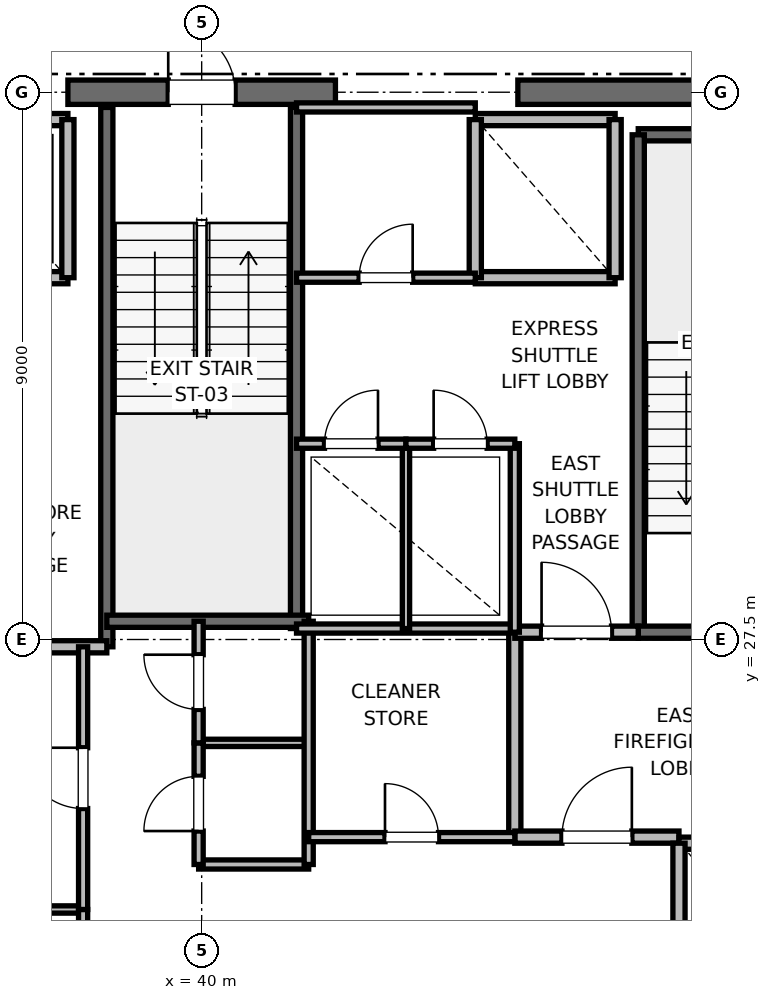
"""IFC4 building model, lengths in metres.
Left out: names, types, materials, properties, quantities, classifications, styles, units other than length and angle.
Written with IfcOpenShell. Run it as: python <this file> out.ifc"""

import sys

from ifc_helpers import new_model, si_unit, direction, frame, frame_2d, origin, place, context, subcontext, project, spatial, rectangle, extrude, element, fill, save


model = new_model("IFC4")
c1 = context("Model", 3, precision=1e-05, world=origin(), true_north=direction((0.0, 1.0)))
c2 = subcontext(c1, "Body", "Model", "MODEL_VIEW")
j1 = project(units=[si_unit("LENGTHUNIT", "METRE"), si_unit("PLANEANGLEUNIT", "RADIAN")], contexts=[c1])
p1 = place(None, origin())
s1 = spatial("IfcSite", under=j1, at=p1, CompositionType="ELEMENT")
p2 = place(p1, origin())
s2 = spatial("IfcBuilding", under=s1, at=p2, CompositionType="ELEMENT")
p3 = place(p2, frame((0.0, 0.0, 326.8)))
s3 = spatial("IfcBuildingStorey", under=s2, at=p3, CompositionType="ELEMENT", Elevation=326.8)
p4 = place(p3, frame((37.8, 36.5, 0.0), z_axis=(0.0, 0.0, 1.0), x_axis=(1.0, 0.0, 0.0)))
e1 = element("IfcWall", 1, at=p4, inside=s3, PredefinedType="SHEAR", context=c2, shape_type="SweptSolid", body=[
    extrude(rectangle(XDim=4.4, YDim=0.4, at=frame_2d((2.2, 0.0))), origin(), (0.0, 0.0, 1.0), 3.785),
])
p5 = place(p4, frame((1.65, 0.0, 0.0)))
e2 = element("IfcOpeningElement", 2, at=p5, cuts=e1, PredefinedType="OPENING", context=c2, shape_type="SweptSolid", body=[
    extrude(rectangle(XDim=1.1, YDim=2.15, at=frame_2d((0.55, 1.075))), frame((0.0, 0.2, 0.0), z_axis=(0.0, -1.0, 0.0), x_axis=(1.0, 0.0, 0.0)), (0.0, 0.0, 1.0), 0.4),
])
p6 = place(p3, frame((45.2, 36.5, 0.0), z_axis=(0.0, 0.0, 1.0), x_axis=(1.0, 0.0, 0.0)))
e3 = element("IfcWall", 3, at=p6, inside=s3, PredefinedType="SHEAR", context=c2, shape_type="SweptSolid", body=[
    extrude(rectangle(XDim=5.8, YDim=0.4, at=frame_2d((2.9, 0.0))), origin(), (0.0, 0.0, 1.0), 3.785),
])
p7 = place(p3, frame((47.18, 35.8, 0.0), z_axis=(0.0, 0.0, 1.0), x_axis=(1.0, 0.0, 0.0)))
e4 = element("IfcWall", 4, at=p7, inside=s3, PredefinedType="SOLIDWALL", context=c2, shape_type="SweptSolid", body=[
    extrude(rectangle(XDim=3.12, YDim=0.2, at=frame_2d((1.56, 0.0))), origin(), (0.0, 0.0, 1.0), 3.785),
])
p8 = place(p3, frame((47.18, 27.62, 0.0), z_axis=(0.0, 0.0, 1.0), x_axis=(0.0, 1.0, 0.0)))
e5 = element("IfcWall", 5, at=p8, inside=s3, PredefinedType="SOLIDWALL", context=c2, shape_type="SweptSolid", body=[
    extrude(rectangle(XDim=8.18, YDim=0.2, at=frame_2d((4.09, 0.0))), origin(), (0.0, 0.0, 1.0), 3.785),
])
p9 = place(p3, frame((47.18, 27.62, 0.0), z_axis=(0.0, 0.0, 1.0), x_axis=(1.0, 0.0, 0.0)))
e6 = element("IfcWall", 6, at=p9, inside=s3, PredefinedType="SOLIDWALL", context=c2, shape_type="SweptSolid", body=[
    extrude(rectangle(XDim=3.12, YDim=0.2, at=frame_2d((1.56, 0.0))), origin(), (0.0, 0.0, 1.0), 3.785),
])
p10 = place(p9, frame((1.01, 0.0, 0.0)))
e7 = element("IfcOpeningElement", 7, at=p10, cuts=e6, PredefinedType="OPENING", context=c2, shape_type="SweptSolid", body=[
    extrude(rectangle(XDim=1.1, YDim=2.15, at=frame_2d((0.55, 1.075))), frame((0.0, 0.1, 0.0), z_axis=(0.0, -1.0, 0.0), x_axis=(1.0, 0.0, 0.0)), (0.0, 0.0, 1.0), 0.2),
])
p11 = place(p3, frame((38.44, 27.38, 0.0), z_axis=(0.0, 0.0, 1.0), x_axis=(0.0, 1.0, 0.0)))
e8 = element("IfcWall", 8, at=p11, inside=s3, PredefinedType="SOLIDWALL", context=c2, shape_type="SweptSolid", body=[
    extrude(rectangle(XDim=8.87, YDim=0.2, at=frame_2d((4.435, 0.0))), origin(), (0.0, 0.0, 1.0), 3.785),
])
p12 = place(p3, frame((41.56, 27.68, 0.0), z_axis=(0.0, 0.0, 1.0), x_axis=(0.0, 1.0, 0.0)))
e9 = element("IfcWall", 9, at=p12, inside=s3, PredefinedType="SOLIDWALL", context=c2, shape_type="SweptSolid", body=[
    extrude(rectangle(XDim=8.57, YDim=0.2, at=frame_2d((4.285, 0.0))), origin(), (0.0, 0.0, 1.0), 3.785),
])
p13 = place(p3, frame((38.44, 27.8, 0.0), z_axis=(0.0, 0.0, 1.0), x_axis=(1.0, 0.0, 0.0)))
e10 = element("IfcWall", 10, at=p13, inside=s3, PredefinedType="SOLIDWALL", context=c2, shape_type="SweptSolid", body=[
    extrude(rectangle(XDim=3.32, YDim=0.2, at=frame_2d((1.66, 0.0))), origin(), (0.0, 0.0, 1.0), 3.785),
])
p14 = place(p3, frame((32.82, 27.38, 0.0), z_axis=(0.0, 0.0, 1.0), x_axis=(1.0, 0.0, 0.0)))
e11 = element("IfcWall", 11, at=p14, inside=s3, PredefinedType="PARTITIONING", context=c2, shape_type="SweptSolid", body=[
    extrude(rectangle(XDim=5.62, YDim=0.2, at=frame_2d((2.81, 0.0))), origin(), (0.0, 0.0, 1.0), 3.785),
])
p15 = place(p3, frame((45.15, 24.25, 0.0), z_axis=(0.0, 0.0, 1.0), x_axis=(0.0, 1.0, 0.0)))
e12 = element("IfcWall", 12, at=p15, inside=s3, PredefinedType="PARTITIONING", context=c2, shape_type="SweptSolid", body=[
    extrude(rectangle(XDim=3.37, YDim=0.2, at=frame_2d((1.685, 0.0))), origin(), (0.0, 0.0, 1.0), 3.785),
])
p16 = place(p3, frame((45.15, 24.25, 0.0), z_axis=(0.0, 0.0, 1.0), x_axis=(1.0, 0.0, 0.0)))
e13 = element("IfcWall", 13, at=p16, inside=s3, PredefinedType="PARTITIONING", context=c2, shape_type="SweptSolid", body=[
    extrude(rectangle(XDim=2.7, YDim=0.2, at=frame_2d((1.35, 0.0))), origin(), (0.0, 0.0, 1.0), 3.785),
])
p17 = place(p16, frame((0.775, 0.0, 0.0)))
e14 = element("IfcOpeningElement", 14, at=p17, cuts=e13, PredefinedType="OPENING", context=c2, shape_type="SweptSolid", body=[
    extrude(rectangle(XDim=1.15, YDim=2.2, at=frame_2d((0.575, 1.1))), frame((0.0, 0.1, 0.0), z_axis=(0.0, -1.0, 0.0), x_axis=(1.0, 0.0, 0.0)), (0.0, 0.0, 1.0), 0.2),
])
p18 = place(p3, frame((45.15, 27.62, 0.0), z_axis=(0.0, 0.0, 1.0), x_axis=(1.0, 0.0, 0.0)))
e15 = element("IfcWall", 15, at=p18, inside=s3, PredefinedType="PARTITIONING", context=c2, shape_type="SweptSolid", body=[
    extrude(rectangle(XDim=2.03, YDim=0.2, at=frame_2d((1.015, 0.0))), origin(), (0.0, 0.0, 1.0), 3.785),
])
p19 = place(p18, frame((0.44, 0.0, 0.0)))
e16 = element("IfcOpeningElement", 16, at=p19, cuts=e15, PredefinedType="OPENING", context=c2, shape_type="SweptSolid", body=[
    extrude(rectangle(XDim=1.15, YDim=2.2, at=frame_2d((0.575, 1.1))), frame((0.0, 0.1, 0.0), z_axis=(0.0, -1.0, 0.0), x_axis=(1.0, 0.0, 0.0)), (0.0, 0.0, 1.0), 0.2),
])
p20 = place(p3, frame((50.45, 24.15, 0.0), z_axis=(0.0, 0.0, 1.0), x_axis=(-1.0, 0.0, 0.0)))
e17 = element("IfcWall", 17, at=p20, inside=s3, PredefinedType="SOLIDWALL", context=c2, shape_type="SweptSolid", body=[
    extrude(rectangle(XDim=2.6, YDim=0.2, at=frame_2d((1.3, 0.0))), origin(), (0.0, 0.0, 1.0), 2.865),
])
p21 = place(p20, frame((0.75, 0.0, 0.0)))
e18 = element("IfcOpeningElement", 18, at=p21, cuts=e17, PredefinedType="OPENING", context=c2, shape_type="SweptSolid", body=[
    extrude(rectangle(XDim=1.1, YDim=2.2, at=frame_2d((0.55, 1.1))), frame((0.0, 0.1, 0.0), z_axis=(0.0, -1.0, 0.0), x_axis=(1.0, 0.0, 0.0)), (0.0, 0.0, 1.0), 0.2),
])
p22 = place(p3, frame((47.85, 24.15, 0.0), z_axis=(0.0, 0.0, 1.0), x_axis=(0.0, -1.0, 0.0)))
e19 = element("IfcWall", 19, at=p22, inside=s3, PredefinedType="SOLIDWALL", context=c2, shape_type="SweptSolid", body=[
    extrude(rectangle(XDim=3.0, YDim=0.2, at=frame_2d((1.5, 0.0))), origin(), (0.0, 0.0, 1.0), 3.785),
])
p23 = place(p3, frame((35.5, 33.45, 0.0), z_axis=(0.0, 0.0, 1.0), x_axis=(1.0, 0.0, 0.0)))
e20 = element("IfcWall", 20, at=p23, inside=s3, PredefinedType="SOLIDWALL", context=c2, shape_type="SweptSolid", body=[
    extrude(rectangle(XDim=2.3, YDim=0.2, at=frame_2d((1.15, 0.0))), origin(), (0.0, 0.0, 1.0), 3.785),
])
p24 = place(p23, frame((0.6, 0.0, 0.0)))
e21 = element("IfcOpeningElement", 21, at=p24, cuts=e20, PredefinedType="OPENING", context=c2, shape_type="SweptSolid", body=[
    extrude(rectangle(XDim=1.1, YDim=2.2, at=frame_2d((0.55, 1.1))), frame((0.0, 0.1, 0.0), z_axis=(0.0, -1.0, 0.0), x_axis=(1.0, 0.0, 0.0)), (0.0, 0.0, 1.0), 0.2),
])
p25 = place(p3, frame((37.8, 36.05, 0.0), z_axis=(0.0, 0.0, 1.0), x_axis=(-1.0, 0.0, 0.0)))
e22 = element("IfcWall", 22, at=p25, inside=s3, PredefinedType="SOLIDWALL", context=c2, shape_type="SweptSolid", body=[
    extrude(rectangle(XDim=2.3, YDim=0.2, at=frame_2d((1.15, 0.0))), origin(), (0.0, 0.0, 1.0), 2.865),
])
p26 = place(p3, frame((37.8, 33.45, 0.0), z_axis=(0.0, 0.0, 1.0), x_axis=(0.0, 1.0, 0.0)))
e23 = element("IfcWall", 23, at=p26, inside=s3, PredefinedType="SOLIDWALL", context=c2, shape_type="SweptSolid", body=[
    extrude(rectangle(XDim=2.6, YDim=0.2, at=frame_2d((1.3, 0.0))), origin(), (0.0, 0.0, 1.0), 2.865),
])
p27 = place(p3, frame((44.5, 33.45, 0.0), z_axis=(0.0, 0.0, 1.0), x_axis=(1.0, 0.0, 0.0)))
e24 = element("IfcWall", 24, at=p27, inside=s3, PredefinedType="SOLIDWALL", context=c2, shape_type="SweptSolid", body=[
    extrude(rectangle(XDim=2.3, YDim=0.2, at=frame_2d((1.15, 0.0))), origin(), (0.0, 0.0, 1.0), 3.785),
])
p28 = place(p3, frame((46.8, 36.05, 0.0), z_axis=(0.0, 0.0, 1.0), x_axis=(-1.0, 0.0, 0.0)))
e25 = element("IfcWall", 25, at=p28, inside=s3, PredefinedType="SOLIDWALL", context=c2, shape_type="SweptSolid", body=[
    extrude(rectangle(XDim=2.3, YDim=0.2, at=frame_2d((1.15, 0.0))), origin(), (0.0, 0.0, 1.0), 2.865),
])
p29 = place(p3, frame((44.5, 36.05, 0.0), z_axis=(0.0, 0.0, 1.0), x_axis=(0.0, -1.0, 0.0)))
e26 = element("IfcWall", 26, at=p29, inside=s3, PredefinedType="SOLIDWALL", context=c2, shape_type="SweptSolid", body=[
    extrude(rectangle(XDim=2.6, YDim=0.2, at=frame_2d((1.3, 0.0))), origin(), (0.0, 0.0, 1.0), 2.865),
])
p30 = place(p3, frame((46.8, 33.45, 0.0), z_axis=(0.0, 0.0, 1.0), x_axis=(0.0, 1.0, 0.0)))
e27 = element("IfcWall", 27, at=p30, inside=s3, PredefinedType="SOLIDWALL", context=c2, shape_type="SweptSolid", body=[
    extrude(rectangle(XDim=2.6, YDim=0.2, at=frame_2d((1.3, 0.0))), origin(), (0.0, 0.0, 1.0), 3.785),
])
p31 = place(p3, frame((39.95, 23.8, 0.0), z_axis=(0.0, 0.0, 1.0), x_axis=(1.0, 0.0, 0.0)))
e28 = element("IfcWall", 28, at=p31, inside=s3, PredefinedType="PARTITIONING", context=c2, shape_type="SweptSolid", body=[
    extrude(rectangle(XDim=1.81, YDim=0.15, at=frame_2d((0.905, 0.0))), origin(), (0.0, 0.0, 1.0), 2.85),
])
p32 = place(p3, frame((39.95, 25.8, 0.0), z_axis=(0.0, 0.0, 1.0), x_axis=(1.0, 0.0, 0.0)))
e29 = element("IfcWall", 29, at=p32, inside=s3, PredefinedType="PARTITIONING", context=c2, shape_type="SweptSolid", body=[
    extrude(rectangle(XDim=1.81, YDim=0.12, at=frame_2d((0.905, 0.0))), origin(), (0.0, 0.0, 1.0), 2.85),
])
p33 = place(p3, frame((41.76, 23.8, 0.0), z_axis=(0.0, 0.0, 1.0), x_axis=(0.0, 1.0, 0.0)))
e30 = element("IfcWall", 30, at=p33, inside=s3, PredefinedType="PARTITIONING", context=c2, shape_type="SweptSolid", body=[
    extrude(rectangle(XDim=4.0, YDim=0.15, at=frame_2d((2.0, 0.0))), origin(), (0.0, 0.0, 1.0), 2.85),
])
p34 = place(p3, frame((39.95, 23.8, 0.0), z_axis=(0.0, 0.0, 1.0), x_axis=(0.0, 1.0, 0.0)))
e31 = element("IfcWall", 31, at=p34, inside=s3, PredefinedType="PARTITIONING", context=c2, shape_type="SweptSolid", body=[
    extrude(rectangle(XDim=2.0, YDim=0.15, at=frame_2d((1.0, 0.0))), origin(), (0.0, 0.0, 1.0), 2.85),
])
p35 = place(p34, frame((0.55, 0.0, 0.0)))
e32 = element("IfcOpeningElement", 32, at=p35, cuts=e31, PredefinedType="OPENING", context=c2, shape_type="SweptSolid", body=[
    extrude(rectangle(XDim=0.9, YDim=2.1, at=frame_2d((0.45, 1.05))), frame((0.0, 0.075, 0.0), z_axis=(0.0, -1.0, 0.0), x_axis=(1.0, 0.0, 0.0)), (0.0, 0.0, 1.0), 0.15),
])
p36 = place(p3, frame((39.95, 25.8, 0.0), z_axis=(0.0, 0.0, 1.0), x_axis=(0.0, 1.0, 0.0)))
e33 = element("IfcWall", 33, at=p36, inside=s3, PredefinedType="PARTITIONING", context=c2, shape_type="SweptSolid", body=[
    extrude(rectangle(XDim=2.0, YDim=0.15, at=frame_2d((1.0, 0.0))), origin(), (0.0, 0.0, 1.0), 2.85),
])
p37 = place(p36, frame((0.55, 0.0, 0.0)))
e34 = element("IfcOpeningElement", 34, at=p37, cuts=e33, PredefinedType="OPENING", context=c2, shape_type="SweptSolid", body=[
    extrude(rectangle(XDim=0.9, YDim=2.1, at=frame_2d((0.45, 1.05))), frame((0.0, 0.075, 0.0), z_axis=(0.0, -1.0, 0.0), x_axis=(1.0, 0.0, 0.0)), (0.0, 0.0, 1.0), 0.15),
])
p38 = place(p3, frame((32.82, 23.06, 0.0), z_axis=(0.0, 0.0, 1.0), x_axis=(1.0, 0.0, 0.0)))
e35 = element("IfcWall", 35, at=p38, inside=s3, PredefinedType="PARTITIONING", context=c2, shape_type="SweptSolid", body=[
    extrude(rectangle(XDim=5.23, YDim=0.12, at=frame_2d((2.615, 0.0))), origin(), (0.0, 0.0, 1.0), 2.85),
])
p39 = place(p3, frame((38.05, 18.6, 0.0), z_axis=(0.0, 0.0, 1.0), x_axis=(0.0, 1.0, 0.0)))
e36 = element("IfcWall", 36, at=p39, inside=s3, PredefinedType="PARTITIONING", context=c2, shape_type="SweptSolid", body=[
    extrude(rectangle(XDim=4.46, YDim=0.15, at=frame_2d((2.23, 0.0))), origin(), (0.0, 0.0, 1.0), 2.85),
])
p40 = place(p39, frame((1.73, 0.0, 0.0)))
e37 = element("IfcOpeningElement", 37, at=p40, cuts=e36, PredefinedType="OPENING", context=c2, shape_type="SweptSolid", body=[
    extrude(rectangle(XDim=1.0, YDim=2.15, at=frame_2d((0.5, 1.075))), frame((0.0, 0.075, 0.0), z_axis=(0.0, -1.0, 0.0), x_axis=(1.0, 0.0, 0.0)), (0.0, 0.0, 1.0), 0.15),
])
p41 = place(p3, frame((38.05, 23.06, 0.0), z_axis=(0.0, 0.0, 1.0), x_axis=(0.0, 1.0, 0.0)))
e38 = element("IfcWall", 38, at=p41, inside=s3, PredefinedType="PARTITIONING", context=c2, shape_type="SweptSolid", body=[
    extrude(rectangle(XDim=4.32, YDim=0.15, at=frame_2d((2.16, 0.0))), origin(), (0.0, 0.0, 1.0), 2.85),
])
p42 = place(p41, frame((1.66, 0.0, 0.0)))
e39 = element("IfcOpeningElement", 39, at=p42, cuts=e38, PredefinedType="OPENING", context=c2, shape_type="SweptSolid", body=[
    extrude(rectangle(XDim=1.0, YDim=2.15, at=frame_2d((0.5, 1.075))), frame((0.0, 0.075, 0.0), z_axis=(0.0, -1.0, 0.0), x_axis=(1.0, 0.0, 0.0)), (0.0, 0.0, 1.0), 0.15),
])
p43 = place(p3, frame((41.56, 27.68, 0.0), z_axis=(0.0, 0.0, 1.0), x_axis=(1.0, 0.0, 0.0)))
e40 = element("IfcWall", 40, at=p43, inside=s3, PredefinedType="PARTITIONING", context=c2, shape_type="SweptSolid", body=[
    extrude(rectangle(XDim=3.59, YDim=0.15, at=frame_2d((1.795, 0.0))), origin(), (0.0, 0.0, 1.0), 2.85),
])
p44 = place(p3, frame((41.76, 24.25, 0.0), z_axis=(0.0, 0.0, 1.0), x_axis=(1.0, 0.0, 0.0)))
e41 = element("IfcWall", 41, at=p44, inside=s3, PredefinedType="PARTITIONING", context=c2, shape_type="SweptSolid", body=[
    extrude(rectangle(XDim=3.39, YDim=0.15, at=frame_2d((1.695, 0.0))), origin(), (0.0, 0.0, 1.0), 2.85),
])
p45 = place(p44, frame((1.255, 0.0, 0.0)))
e42 = element("IfcOpeningElement", 42, at=p45, cuts=e41, PredefinedType="OPENING", context=c2, shape_type="SweptSolid", body=[
    extrude(rectangle(XDim=0.88, YDim=2.1, at=frame_2d((0.44, 1.05))), frame((0.0, 0.075, 0.0), z_axis=(0.0, -1.0, 0.0), x_axis=(1.0, 0.0, 0.0)), (0.0, 0.0, 1.0), 0.15),
])
p46 = place(p3, frame((45.15, 27.62, 0.0), z_axis=(0.0, 0.0, 1.0), x_axis=(0.0, 1.0, 0.0)))
e43 = element("IfcWall", 43, at=p46, inside=s3, PredefinedType="PARTITIONING", context=c2, shape_type="SweptSolid", body=[
    extrude(rectangle(XDim=3.1, YDim=0.15, at=frame_2d((1.55, 0.0))), origin(), (0.0, 0.0, 1.0), 2.85),
])
p47 = place(p3, frame((43.36, 27.68, 0.0), z_axis=(0.0, 0.0, 1.0), x_axis=(0.0, 1.0, 0.0)))
e44 = element("IfcWall", 44, at=p47, inside=s3, PredefinedType="PARTITIONING", context=c2, shape_type="SweptSolid", body=[
    extrude(rectangle(XDim=3.04, YDim=0.12, at=frame_2d((1.52, 0.0))), origin(), (0.0, 0.0, 1.0), 2.85),
])
p48 = place(p3, frame((41.56, 30.72, 0.0), z_axis=(0.0, 0.0, 1.0), x_axis=(1.0, 0.0, 0.0)))
e45 = element("IfcWall", 45, at=p48, inside=s3, PredefinedType="PARTITIONING", context=c2, shape_type="SweptSolid", body=[
    extrude(rectangle(XDim=1.8, YDim=0.15, at=frame_2d((0.9, 0.0))), origin(), (0.0, 0.0, 1.0), 2.85),
])
p49 = place(p48, frame((0.46, 0.0, 0.0)))
e46 = element("IfcOpeningElement", 46, at=p49, cuts=e45, PredefinedType="OPENING", context=c2, shape_type="SweptSolid", body=[
    extrude(rectangle(XDim=0.88, YDim=2.1, at=frame_2d((0.44, 1.05))), frame((0.0, 0.075, 0.0), z_axis=(0.0, -1.0, 0.0), x_axis=(1.0, 0.0, 0.0)), (0.0, 0.0, 1.0), 0.15),
])
p50 = place(p3, frame((43.36, 30.72, 0.0), z_axis=(0.0, 0.0, 1.0), x_axis=(1.0, 0.0, 0.0)))
e47 = element("IfcWall", 47, at=p50, inside=s3, PredefinedType="PARTITIONING", context=c2, shape_type="SweptSolid", body=[
    extrude(rectangle(XDim=1.79, YDim=0.15, at=frame_2d((0.895, 0.0))), origin(), (0.0, 0.0, 1.0), 2.85),
])
p51 = place(p50, frame((0.455, 0.0, 0.0)))
e48 = element("IfcOpeningElement", 48, at=p51, cuts=e47, PredefinedType="OPENING", context=c2, shape_type="SweptSolid", body=[
    extrude(rectangle(XDim=0.88, YDim=2.1, at=frame_2d((0.44, 1.05))), frame((0.0, 0.075, 0.0), z_axis=(0.0, -1.0, 0.0), x_axis=(1.0, 0.0, 0.0)), (0.0, 0.0, 1.0), 0.15),
])
p52 = place(p3, frame((41.56, 36.25, 0.0), z_axis=(0.0, 0.0, 1.0), x_axis=(1.0, 0.0, 0.0)))
e49 = element("IfcWall", 49, at=p52, inside=s3, PredefinedType="PARTITIONING", context=c2, shape_type="SweptSolid", body=[
    extrude(rectangle(XDim=2.94, YDim=0.15, at=frame_2d((1.47, 0.0))), origin(), (0.0, 0.0, 1.0), 2.85),
])
p53 = place(p3, frame((41.56, 33.45, 0.0), z_axis=(0.0, 0.0, 1.0), x_axis=(1.0, 0.0, 0.0)))
e50 = element("IfcWall", 50, at=p53, inside=s3, PredefinedType="PARTITIONING", context=c2, shape_type="SweptSolid", body=[
    extrude(rectangle(XDim=2.94, YDim=0.15, at=frame_2d((1.47, 0.0))), origin(), (0.0, 0.0, 1.0), 2.85),
])
p54 = place(p53, frame((1.03, 0.0, 0.0)))
e51 = element("IfcOpeningElement", 51, at=p54, cuts=e50, PredefinedType="OPENING", context=c2, shape_type="SweptSolid", body=[
    extrude(rectangle(XDim=0.88, YDim=2.1, at=frame_2d((0.44, 1.05))), frame((0.0, 0.075, 0.0), z_axis=(0.0, -1.0, 0.0), x_axis=(1.0, 0.0, 0.0)), (0.0, 0.0, 1.0), 0.15),
])
p55 = place(p5, origin())
e52 = element("IfcDoor", 52, at=p55, inside=s3, OperationType="SINGLE_SWING_LEFT", PredefinedType="DOOR", context=c2, shape_type="SweptSolid", body=[
    extrude(rectangle(XDim=1.1, YDim=2.15, at=frame_2d((0.55, 1.075))), frame((0.0, 0.025, 0.0), z_axis=(0.0, -1.0, 0.0), x_axis=(1.0, 0.0, 0.0)), (0.0, 0.0, 1.0), 0.05),
])
fill(e2, e52)
p56 = place(p17, origin())
e53 = element("IfcDoor", 53, at=p56, inside=s3, OperationType="SINGLE_SWING_RIGHT", PredefinedType="DOOR", context=c2, shape_type="SweptSolid", body=[
    extrude(rectangle(XDim=1.15, YDim=2.2, at=frame_2d((0.575, 1.1))), frame((0.0, 0.025, 0.0), z_axis=(0.0, -1.0, 0.0), x_axis=(1.0, 0.0, 0.0)), (0.0, 0.0, 1.0), 0.05),
])
fill(e14, e53)
p57 = place(p19, origin())
e54 = element("IfcDoor", 54, at=p57, inside=s3, OperationType="SINGLE_SWING_LEFT", PredefinedType="DOOR", context=c2, shape_type="SweptSolid", body=[
    extrude(rectangle(XDim=1.15, YDim=2.2, at=frame_2d((0.575, 1.1))), frame((0.0, 0.025, 0.0), z_axis=(0.0, -1.0, 0.0), x_axis=(1.0, 0.0, 0.0)), (0.0, 0.0, 1.0), 0.05),
])
fill(e16, e54)
p58 = place(p35, origin())
e55 = element("IfcDoor", 55, at=p58, inside=s3, OperationType="SINGLE_SWING_LEFT", PredefinedType="DOOR", context=c2, shape_type="SweptSolid", body=[
    extrude(rectangle(XDim=0.9, YDim=2.1, at=frame_2d((0.45, 1.05))), frame((0.0, 0.025, 0.0), z_axis=(0.0, -1.0, 0.0), x_axis=(1.0, 0.0, 0.0)), (0.0, 0.0, 1.0), 0.05),
])
fill(e32, e55)
p59 = place(p37, origin())
e56 = element("IfcDoor", 56, at=p59, inside=s3, OperationType="SINGLE_SWING_RIGHT", PredefinedType="DOOR", context=c2, shape_type="SweptSolid", body=[
    extrude(rectangle(XDim=0.9, YDim=2.1, at=frame_2d((0.45, 1.05))), frame((0.0, 0.025, 0.0), z_axis=(0.0, -1.0, 0.0), x_axis=(1.0, 0.0, 0.0)), (0.0, 0.0, 1.0), 0.05),
])
fill(e34, e56)
p60 = place(p42, origin())
e57 = element("IfcDoor", 57, at=p60, inside=s3, OperationType="SINGLE_SWING_RIGHT", PredefinedType="DOOR", context=c2, shape_type="SweptSolid", body=[
    extrude(rectangle(XDim=1.0, YDim=2.15, at=frame_2d((0.5, 1.075))), frame((0.0, 0.025, 0.0), z_axis=(0.0, -1.0, 0.0), x_axis=(1.0, 0.0, 0.0)), (0.0, 0.0, 1.0), 0.05),
])
fill(e39, e57)
p61 = place(p45, origin())
e58 = element("IfcDoor", 58, at=p61, inside=s3, OperationType="SINGLE_SWING_LEFT", PredefinedType="DOOR", context=c2, shape_type="SweptSolid", body=[
    extrude(rectangle(XDim=0.88, YDim=2.1, at=frame_2d((0.44, 1.05))), frame((0.0, 0.025, 0.0), z_axis=(0.0, -1.0, 0.0), x_axis=(1.0, 0.0, 0.0)), (0.0, 0.0, 1.0), 0.05),
])
fill(e42, e58)
p62 = place(p49, origin())
e59 = element("IfcDoor", 59, at=p62, inside=s3, OperationType="SINGLE_SWING_RIGHT", PredefinedType="DOOR", context=c2, shape_type="SweptSolid", body=[
    extrude(rectangle(XDim=0.88, YDim=2.1, at=frame_2d((0.44, 1.05))), frame((0.0, 0.025, 0.0), z_axis=(0.0, -1.0, 0.0), x_axis=(1.0, 0.0, 0.0)), (0.0, 0.0, 1.0), 0.05),
])
fill(e46, e59)
p63 = place(p51, origin())
e60 = element("IfcDoor", 60, at=p63, inside=s3, OperationType="SINGLE_SWING_LEFT", PredefinedType="DOOR", context=c2, shape_type="SweptSolid", body=[
    extrude(rectangle(XDim=0.88, YDim=2.1, at=frame_2d((0.44, 1.05))), frame((0.0, 0.025, 0.0), z_axis=(0.0, -1.0, 0.0), x_axis=(1.0, 0.0, 0.0)), (0.0, 0.0, 1.0), 0.05),
])
fill(e48, e60)
p64 = place(p54, origin())
e61 = element("IfcDoor", 61, at=p64, inside=s3, OperationType="SINGLE_SWING_RIGHT", PredefinedType="DOOR", context=c2, shape_type="SweptSolid", body=[
    extrude(rectangle(XDim=0.88, YDim=2.1, at=frame_2d((0.44, 1.05))), frame((0.0, 0.025, 0.0), z_axis=(0.0, -1.0, 0.0), x_axis=(1.0, 0.0, 0.0)), (0.0, 0.0, 1.0), 0.05),
])
fill(e51, e61)
save(model, sys.argv[1])
